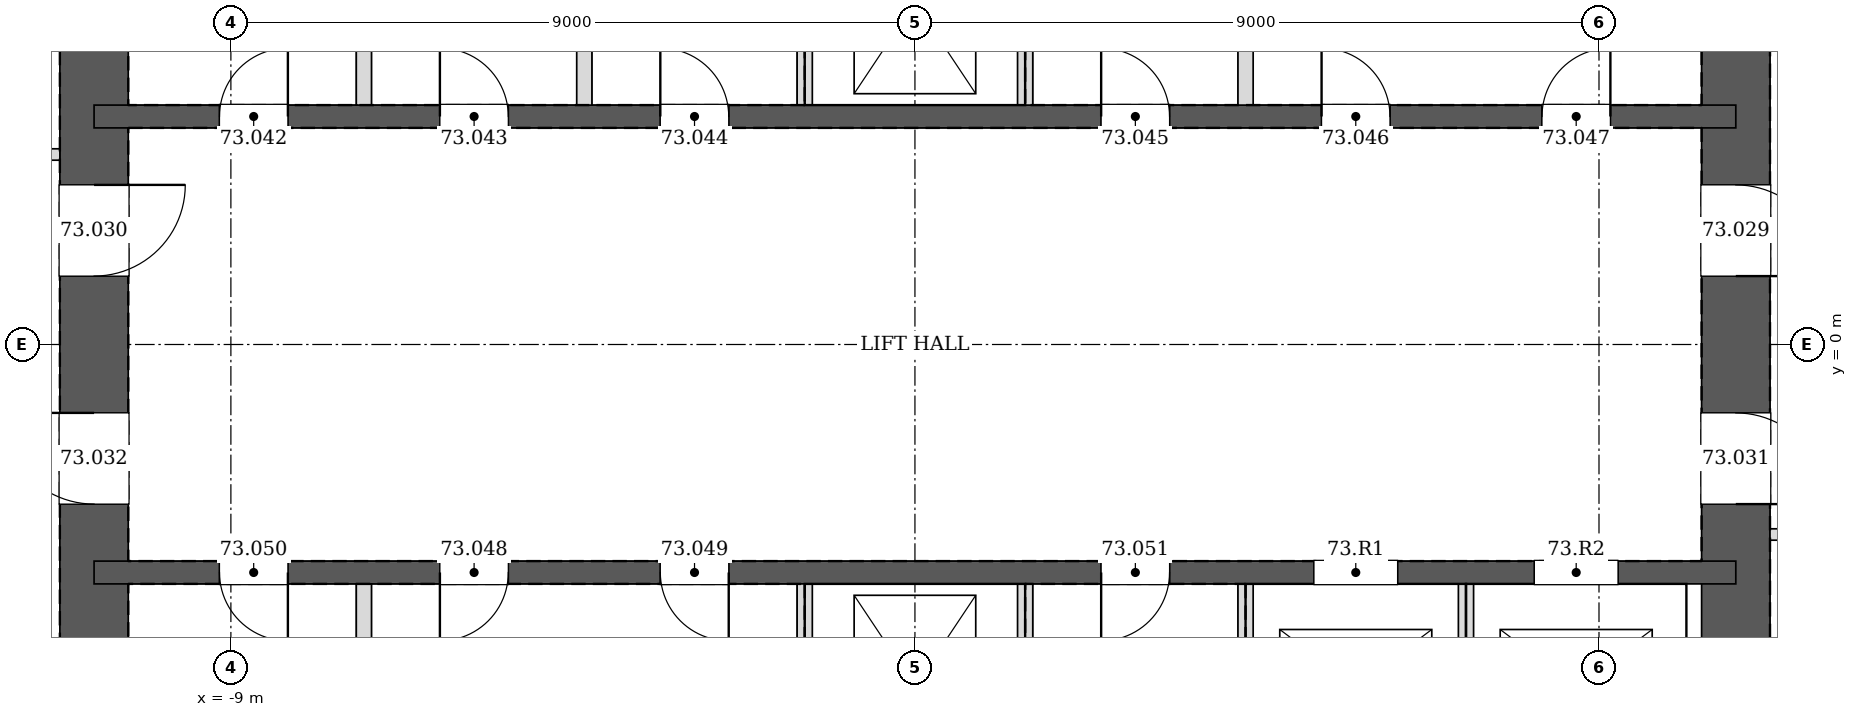
"""IFC4 building model, lengths in metres.
Left out: names, types, materials, properties, quantities, classifications, styles, units other than length and angle.
Written with IfcOpenShell. Run it as: python <this file> out.ifc"""

import sys

from ifc_helpers import new_model, si_unit, direction, frame, frame_2d, origin, place, context, subcontext, project, spatial, rectangle, extrude, element, fill, save


model = new_model("IFC4")
c1 = context("Model", 3, precision=1e-05, world=origin(), true_north=direction((0.0, 1.0)))
c2 = subcontext(c1, "Body", "Model", "MODEL_VIEW")
j1 = project(units=[si_unit("LENGTHUNIT", "METRE"), si_unit("PLANEANGLEUNIT", "RADIAN")], contexts=[c1])
p1 = place(None, origin())
s1 = spatial("IfcSite", under=j1, at=p1, CompositionType="ELEMENT")
p2 = place(p1, origin())
s2 = spatial("IfcBuilding", under=s1, at=p2, CompositionType="ELEMENT")
p3 = place(p2, frame((0.0, 0.0, 298.0)))
s3 = spatial("IfcBuildingStorey", under=s2, at=p3, CompositionType="ELEMENT", Elevation=298.0)
p4 = place(p3, frame((10.8, -10.8, 0.0), z_axis=(0.0, 0.0, 1.0), x_axis=(0.0, 1.0, 0.0)))
e1 = element("IfcWall", 1, at=p4, inside=s3, PredefinedType="SOLIDWALL", context=c2, shape_type="SweptSolid", body=[
    extrude(rectangle(XDim=21.6, YDim=0.9, at=frame_2d((10.8, 0.0))), origin(), (0.0, 0.0, 1.0), 3.4),
])
p5 = place(p4, frame((11.7, 0.0, 0.0)))
e2 = element("IfcOpeningElement", 2, at=p5, cuts=e1, PredefinedType="OPENING", context=c2, shape_type="SweptSolid", body=[
    extrude(rectangle(XDim=1.2, YDim=2.1, at=frame_2d((0.6, 1.05))), frame((0.0, 0.46, 0.0), z_axis=(0.0, -1.0, 0.0), x_axis=(1.0, 0.0, 0.0)), (0.0, 0.0, 1.0), 0.92),
])
p6 = place(p4, frame((8.7, 0.0, 0.0)))
e3 = element("IfcOpeningElement", 3, at=p6, cuts=e1, PredefinedType="OPENING", context=c2, shape_type="SweptSolid", body=[
    extrude(rectangle(XDim=1.2, YDim=2.1, at=frame_2d((0.6, 1.05))), frame((0.0, 0.46, 0.0), z_axis=(0.0, -1.0, 0.0), x_axis=(1.0, 0.0, 0.0)), (0.0, 0.0, 1.0), 0.92),
])
p7 = place(p3, frame((-10.8, 10.8, 0.0), z_axis=(0.0, 0.0, 1.0), x_axis=(0.0, -1.0, 0.0)))
e4 = element("IfcWall", 4, at=p7, inside=s3, PredefinedType="SOLIDWALL", context=c2, shape_type="SweptSolid", body=[
    extrude(rectangle(XDim=21.6, YDim=0.9, at=frame_2d((10.8, 0.0))), origin(), (0.0, 0.0, 1.0), 3.4),
])
p8 = place(p7, frame((8.7, 0.0, 0.0)))
e5 = element("IfcOpeningElement", 5, at=p8, cuts=e4, PredefinedType="OPENING", context=c2, shape_type="SweptSolid", body=[
    extrude(rectangle(XDim=1.2, YDim=2.1, at=frame_2d((0.6, 1.05))), frame((0.0, 0.46, 0.0), z_axis=(0.0, -1.0, 0.0), x_axis=(1.0, 0.0, 0.0)), (0.0, 0.0, 1.0), 0.92),
])
p9 = place(p7, frame((11.7, 0.0, 0.0)))
e6 = element("IfcOpeningElement", 6, at=p9, cuts=e4, PredefinedType="OPENING", context=c2, shape_type="SweptSolid", body=[
    extrude(rectangle(XDim=1.2, YDim=2.1, at=frame_2d((0.6, 1.05))), frame((0.0, 0.46, 0.0), z_axis=(0.0, -1.0, 0.0), x_axis=(1.0, 0.0, 0.0)), (0.0, 0.0, 1.0), 0.92),
])
p10 = place(p3, frame((-10.8, 3.0, 0.0), z_axis=(0.0, 0.0, 1.0), x_axis=(1.0, 0.0, 0.0)))
e7 = element("IfcWall", 7, at=p10, inside=s3, PredefinedType="SOLIDWALL", context=c2, shape_type="SweptSolid", body=[
    extrude(rectangle(XDim=21.6, YDim=0.3, at=frame_2d((10.8, 0.0))), origin(), (0.0, 0.0, 1.0), 3.4),
])
p11 = place(p10, frame((1.65, 0.0, 0.0)))
e8 = element("IfcOpeningElement", 8, at=p11, cuts=e7, PredefinedType="OPENING", context=c2, shape_type="SweptSolid", body=[
    extrude(rectangle(XDim=0.9, YDim=2.1, at=frame_2d((0.45, 1.05))), frame((0.0, 0.16, 0.0), z_axis=(0.0, -1.0, 0.0), x_axis=(1.0, 0.0, 0.0)), (0.0, 0.0, 1.0), 0.32),
])
p12 = place(p10, frame((4.55, 0.0, 0.0)))
e9 = element("IfcOpeningElement", 9, at=p12, cuts=e7, PredefinedType="OPENING", context=c2, shape_type="SweptSolid", body=[
    extrude(rectangle(XDim=0.9, YDim=2.1, at=frame_2d((0.45, 1.05))), frame((0.0, 0.16, 0.0), z_axis=(0.0, -1.0, 0.0), x_axis=(1.0, 0.0, 0.0)), (0.0, 0.0, 1.0), 0.32),
])
p13 = place(p10, frame((7.45, 0.0, 0.0)))
e10 = element("IfcOpeningElement", 10, at=p13, cuts=e7, PredefinedType="OPENING", context=c2, shape_type="SweptSolid", body=[
    extrude(rectangle(XDim=0.9, YDim=2.1, at=frame_2d((0.45, 1.05))), frame((0.0, 0.16, 0.0), z_axis=(0.0, -1.0, 0.0), x_axis=(1.0, 0.0, 0.0)), (0.0, 0.0, 1.0), 0.32),
])
p14 = place(p10, frame((13.25, 0.0, 0.0)))
e11 = element("IfcOpeningElement", 11, at=p14, cuts=e7, PredefinedType="OPENING", context=c2, shape_type="SweptSolid", body=[
    extrude(rectangle(XDim=0.9, YDim=2.1, at=frame_2d((0.45, 1.05))), frame((0.0, 0.16, 0.0), z_axis=(0.0, -1.0, 0.0), x_axis=(1.0, 0.0, 0.0)), (0.0, 0.0, 1.0), 0.32),
])
p15 = place(p10, frame((16.15, 0.0, 0.0)))
e12 = element("IfcOpeningElement", 12, at=p15, cuts=e7, PredefinedType="OPENING", context=c2, shape_type="SweptSolid", body=[
    extrude(rectangle(XDim=0.9, YDim=2.1, at=frame_2d((0.45, 1.05))), frame((0.0, 0.16, 0.0), z_axis=(0.0, -1.0, 0.0), x_axis=(1.0, 0.0, 0.0)), (0.0, 0.0, 1.0), 0.32),
])
p16 = place(p10, frame((19.05, 0.0, 0.0)))
e13 = element("IfcOpeningElement", 13, at=p16, cuts=e7, PredefinedType="OPENING", context=c2, shape_type="SweptSolid", body=[
    extrude(rectangle(XDim=0.9, YDim=2.1, at=frame_2d((0.45, 1.05))), frame((0.0, 0.16, 0.0), z_axis=(0.0, -1.0, 0.0), x_axis=(1.0, 0.0, 0.0)), (0.0, 0.0, 1.0), 0.32),
])
p17 = place(p3, frame((-10.8, -3.0, 0.0), z_axis=(0.0, 0.0, 1.0), x_axis=(1.0, 0.0, 0.0)))
e14 = element("IfcWall", 14, at=p17, inside=s3, PredefinedType="SOLIDWALL", context=c2, shape_type="SweptSolid", body=[
    extrude(rectangle(XDim=21.6, YDim=0.3, at=frame_2d((10.8, 0.0))), origin(), (0.0, 0.0, 1.0), 3.4),
])
p18 = place(p17, frame((4.55, 0.0, 0.0)))
e15 = element("IfcOpeningElement", 15, at=p18, cuts=e14, PredefinedType="OPENING", context=c2, shape_type="SweptSolid", body=[
    extrude(rectangle(XDim=0.9, YDim=2.1, at=frame_2d((0.45, 1.05))), frame((0.0, 0.16, 0.0), z_axis=(0.0, -1.0, 0.0), x_axis=(1.0, 0.0, 0.0)), (0.0, 0.0, 1.0), 0.32),
])
p19 = place(p17, frame((7.45, 0.0, 0.0)))
e16 = element("IfcOpeningElement", 16, at=p19, cuts=e14, PredefinedType="OPENING", context=c2, shape_type="SweptSolid", body=[
    extrude(rectangle(XDim=0.9, YDim=2.1, at=frame_2d((0.45, 1.05))), frame((0.0, 0.16, 0.0), z_axis=(0.0, -1.0, 0.0), x_axis=(1.0, 0.0, 0.0)), (0.0, 0.0, 1.0), 0.32),
])
p20 = place(p17, frame((1.65, 0.0, 0.0)))
e17 = element("IfcOpeningElement", 17, at=p20, cuts=e14, PredefinedType="OPENING", context=c2, shape_type="SweptSolid", body=[
    extrude(rectangle(XDim=0.9, YDim=2.1, at=frame_2d((0.45, 1.05))), frame((0.0, 0.16, 0.0), z_axis=(0.0, -1.0, 0.0), x_axis=(1.0, 0.0, 0.0)), (0.0, 0.0, 1.0), 0.32),
])
p21 = place(p17, frame((13.25, 0.0, 0.0)))
e18 = element("IfcOpeningElement", 18, at=p21, cuts=e14, PredefinedType="OPENING", context=c2, shape_type="SweptSolid", body=[
    extrude(rectangle(XDim=0.9, YDim=2.1, at=frame_2d((0.45, 1.05))), frame((0.0, 0.16, 0.0), z_axis=(0.0, -1.0, 0.0), x_axis=(1.0, 0.0, 0.0)), (0.0, 0.0, 1.0), 0.32),
])
p22 = place(p17, frame((16.05, 0.0, 0.0)))
e19 = element("IfcOpeningElement", 19, at=p22, cuts=e14, PredefinedType="OPENING", context=c2, shape_type="SweptSolid", body=[
    extrude(rectangle(XDim=1.1, YDim=2.1, at=frame_2d((0.55, 1.05))), frame((0.0, 0.16, 0.0), z_axis=(0.0, -1.0, 0.0), x_axis=(1.0, 0.0, 0.0)), (0.0, 0.0, 1.0), 0.32),
])
p23 = place(p17, frame((18.95, 0.0, 0.0)))
e20 = element("IfcOpeningElement", 20, at=p23, cuts=e14, PredefinedType="OPENING", context=c2, shape_type="SweptSolid", body=[
    extrude(rectangle(XDim=1.1, YDim=2.1, at=frame_2d((0.55, 1.05))), frame((0.0, 0.16, 0.0), z_axis=(0.0, -1.0, 0.0), x_axis=(1.0, 0.0, 0.0)), (0.0, 0.0, 1.0), 0.32),
])
p24 = place(p3, frame((11.25, -2.5, 0.0), z_axis=(0.0, 0.0, 1.0), x_axis=(1.0, 0.0, 0.0)))
e21 = element("IfcWall", 21, at=p24, inside=s3, PredefinedType="PARTITIONING", context=c2, shape_type="SweptSolid", body=[
    extrude(rectangle(XDim=1.65, YDim=0.15, at=frame_2d((0.825, 0.0))), origin(), (0.0, 0.0, 1.0), 3.2),
])
p25 = place(p3, frame((-11.25, 2.5, 0.0), z_axis=(0.0, 0.0, 1.0), x_axis=(-1.0, 0.0, 0.0)))
e22 = element("IfcWall", 22, at=p25, inside=s3, PredefinedType="PARTITIONING", context=c2, shape_type="SweptSolid", body=[
    extrude(rectangle(XDim=1.65, YDim=0.15, at=frame_2d((0.825, 0.0))), origin(), (0.0, 0.0, 1.0), 3.2),
])
p26 = place(p25, frame((0.35, 0.0, 0.0)))
e23 = element("IfcOpeningElement", 23, at=p26, cuts=e22, PredefinedType="OPENING", context=c2, shape_type="SweptSolid", body=[
    extrude(rectangle(XDim=0.95, YDim=2.1, at=frame_2d((0.475, 1.05))), frame((0.0, 0.085, 0.0), z_axis=(0.0, -1.0, 0.0), x_axis=(1.0, 0.0, 0.0)), (0.0, 0.0, 1.0), 0.17),
])
for number, where, z_axis, x_axis in (
    (24, (-7.25, 3.15, 0.0), (0.0, 0.0, 1.0), (0.0, 1.0, 0.0)),
    (25, (-4.35, 3.15, 0.0), (0.0, 0.0, 1.0), (0.0, 1.0, 0.0)),
    (26, (-1.45, 3.15, 0.0), (0.0, 0.0, 1.0), (0.0, 1.0, 0.0)),
    (27, (1.45, 3.15, 0.0), (0.0, 0.0, 1.0), (0.0, 1.0, 0.0)),
    (28, (4.35, 3.15, 0.0), (0.0, 0.0, 1.0), (0.0, 1.0, 0.0)),
    (29, (-7.25, -5.85, 0.0), (0.0, 0.0, 1.0), (0.0, 1.0, 0.0)),
    (30, (-1.45, -5.85, 0.0), (0.0, 0.0, 1.0), (0.0, 1.0, 0.0)),
    (31, (1.45, -5.85, 0.0), (0.0, 0.0, 1.0), (0.0, 1.0, 0.0)),
    (32, (4.35, -5.85, 0.0), (0.0, 0.0, 1.0), (0.0, 1.0, 0.0)),
):
    element("IfcWall", number, at=place(p3, frame(where, z_axis=z_axis, x_axis=x_axis)), inside=s3, PredefinedType="PARTITIONING", context=c2, shape_type="SweptSolid", body=[
        extrude(rectangle(XDim=2.7, YDim=0.2, at=frame_2d((1.35, 0.0))), origin(), (0.0, 0.0, 1.0), 3.2),
    ])
p27 = place(p3, frame((7.25, -5.85, 0.0), z_axis=(0.0, 0.0, 1.0), x_axis=(0.0, 1.0, 0.0)))
e33 = element("IfcWall", 33, at=p27, inside=s3, PredefinedType="PARTITIONING", context=c2, shape_type="SweptSolid", body=[
    extrude(rectangle(XDim=2.7, YDim=0.2, at=frame_2d((1.35, 0.0))), origin(), (0.0, 0.0, 1.0), 3.4),
])
p28 = place(p5, frame((1.2, 0.0, 0.0), z_axis=(0.0, 0.0, 1.0), x_axis=(-1.0, 0.0, 0.0)))
e34 = element("IfcDoor", 34, at=p28, inside=s3, OperationType="SINGLE_SWING_RIGHT", PredefinedType="DOOR", context=c2, shape_type="SweptSolid", body=[
    extrude(rectangle(XDim=1.2, YDim=2.1, at=frame_2d((0.6, 1.05))), frame((0.0, 0.025, 0.0), z_axis=(0.0, -1.0, 0.0), x_axis=(1.0, 0.0, 0.0)), (0.0, 0.0, 1.0), 0.05),
])
fill(e2, e34)
p29 = place(p8, origin())
e35 = element("IfcDoor", 35, at=p29, inside=s3, OperationType="SINGLE_SWING_LEFT", PredefinedType="DOOR", context=c2, shape_type="SweptSolid", body=[
    extrude(rectangle(XDim=1.2, YDim=2.1, at=frame_2d((0.6, 1.05))), frame((0.0, 0.025, 0.0), z_axis=(0.0, -1.0, 0.0), x_axis=(1.0, 0.0, 0.0)), (0.0, 0.0, 1.0), 0.05),
])
fill(e5, e35)
p30 = place(p6, frame((1.2, 0.0, 0.0), z_axis=(0.0, 0.0, 1.0), x_axis=(-1.0, 0.0, 0.0)))
e36 = element("IfcDoor", 36, at=p30, inside=s3, OperationType="SINGLE_SWING_RIGHT", PredefinedType="DOOR", context=c2, shape_type="SweptSolid", body=[
    extrude(rectangle(XDim=1.2, YDim=2.1, at=frame_2d((0.6, 1.05))), frame((0.0, 0.025, 0.0), z_axis=(0.0, -1.0, 0.0), x_axis=(1.0, 0.0, 0.0)), (0.0, 0.0, 1.0), 0.05),
])
fill(e3, e36)
p31 = place(p9, frame((1.2, 0.0, 0.0), z_axis=(0.0, 0.0, 1.0), x_axis=(-1.0, 0.0, 0.0)))
e37 = element("IfcDoor", 37, at=p31, inside=s3, OperationType="SINGLE_SWING_RIGHT", PredefinedType="DOOR", context=c2, shape_type="SweptSolid", body=[
    extrude(rectangle(XDim=1.2, YDim=2.1, at=frame_2d((0.6, 1.05))), frame((0.0, 0.025, 0.0), z_axis=(0.0, -1.0, 0.0), x_axis=(1.0, 0.0, 0.0)), (0.0, 0.0, 1.0), 0.05),
])
fill(e6, e37)
p32 = place(p11, origin())
e38 = element("IfcDoor", 38, at=p32, inside=s3, OperationType="SINGLE_SWING_RIGHT", PredefinedType="DOOR", context=c2, shape_type="SweptSolid", body=[
    extrude(rectangle(XDim=0.9, YDim=2.1, at=frame_2d((0.45, 1.05))), frame((0.0, 0.025, 0.0), z_axis=(0.0, -1.0, 0.0), x_axis=(1.0, 0.0, 0.0)), (0.0, 0.0, 1.0), 0.05),
])
fill(e8, e38)
p33 = place(p12, origin())
e39 = element("IfcDoor", 39, at=p33, inside=s3, OperationType="SINGLE_SWING_LEFT", PredefinedType="DOOR", context=c2, shape_type="SweptSolid", body=[
    extrude(rectangle(XDim=0.9, YDim=2.1, at=frame_2d((0.45, 1.05))), frame((0.0, 0.025, 0.0), z_axis=(0.0, -1.0, 0.0), x_axis=(1.0, 0.0, 0.0)), (0.0, 0.0, 1.0), 0.05),
])
fill(e9, e39)
p34 = place(p13, origin())
e40 = element("IfcDoor", 40, at=p34, inside=s3, OperationType="SINGLE_SWING_LEFT", PredefinedType="DOOR", context=c2, shape_type="SweptSolid", body=[
    extrude(rectangle(XDim=0.9, YDim=2.1, at=frame_2d((0.45, 1.05))), frame((0.0, 0.025, 0.0), z_axis=(0.0, -1.0, 0.0), x_axis=(1.0, 0.0, 0.0)), (0.0, 0.0, 1.0), 0.05),
])
fill(e10, e40)
p35 = place(p14, origin())
e41 = element("IfcDoor", 41, at=p35, inside=s3, OperationType="SINGLE_SWING_LEFT", PredefinedType="DOOR", context=c2, shape_type="SweptSolid", body=[
    extrude(rectangle(XDim=0.9, YDim=2.1, at=frame_2d((0.45, 1.05))), frame((0.0, 0.025, 0.0), z_axis=(0.0, -1.0, 0.0), x_axis=(1.0, 0.0, 0.0)), (0.0, 0.0, 1.0), 0.05),
])
fill(e11, e41)
p36 = place(p15, origin())
e42 = element("IfcDoor", 42, at=p36, inside=s3, OperationType="SINGLE_SWING_LEFT", PredefinedType="DOOR", context=c2, shape_type="SweptSolid", body=[
    extrude(rectangle(XDim=0.9, YDim=2.1, at=frame_2d((0.45, 1.05))), frame((0.0, 0.025, 0.0), z_axis=(0.0, -1.0, 0.0), x_axis=(1.0, 0.0, 0.0)), (0.0, 0.0, 1.0), 0.05),
])
fill(e12, e42)
p37 = place(p16, origin())
e43 = element("IfcDoor", 43, at=p37, inside=s3, OperationType="SINGLE_SWING_RIGHT", PredefinedType="DOOR", context=c2, shape_type="SweptSolid", body=[
    extrude(rectangle(XDim=0.9, YDim=2.1, at=frame_2d((0.45, 1.05))), frame((0.0, 0.025, 0.0), z_axis=(0.0, -1.0, 0.0), x_axis=(1.0, 0.0, 0.0)), (0.0, 0.0, 1.0), 0.05),
])
fill(e13, e43)
p38 = place(p18, frame((0.9, 0.0, 0.0), z_axis=(0.0, 0.0, 1.0), x_axis=(-1.0, 0.0, 0.0)))
e44 = element("IfcDoor", 44, at=p38, inside=s3, OperationType="SINGLE_SWING_RIGHT", PredefinedType="DOOR", context=c2, shape_type="SweptSolid", body=[
    extrude(rectangle(XDim=0.9, YDim=2.1, at=frame_2d((0.45, 1.05))), frame((0.0, 0.025, 0.0), z_axis=(0.0, -1.0, 0.0), x_axis=(1.0, 0.0, 0.0)), (0.0, 0.0, 1.0), 0.05),
])
fill(e15, e44)
p39 = place(p19, frame((0.9, 0.0, 0.0), z_axis=(0.0, 0.0, 1.0), x_axis=(-1.0, 0.0, 0.0)))
e45 = element("IfcDoor", 45, at=p39, inside=s3, OperationType="SINGLE_SWING_LEFT", PredefinedType="DOOR", context=c2, shape_type="SweptSolid", body=[
    extrude(rectangle(XDim=0.9, YDim=2.1, at=frame_2d((0.45, 1.05))), frame((0.0, 0.025, 0.0), z_axis=(0.0, -1.0, 0.0), x_axis=(1.0, 0.0, 0.0)), (0.0, 0.0, 1.0), 0.05),
])
fill(e16, e45)
p40 = place(p20, frame((0.9, 0.0, 0.0), z_axis=(0.0, 0.0, 1.0), x_axis=(-1.0, 0.0, 0.0)))
e46 = element("IfcDoor", 46, at=p40, inside=s3, OperationType="SINGLE_SWING_LEFT", PredefinedType="DOOR", context=c2, shape_type="SweptSolid", body=[
    extrude(rectangle(XDim=0.9, YDim=2.1, at=frame_2d((0.45, 1.05))), frame((0.0, 0.025, 0.0), z_axis=(0.0, -1.0, 0.0), x_axis=(1.0, 0.0, 0.0)), (0.0, 0.0, 1.0), 0.05),
])
fill(e17, e46)
p41 = place(p21, frame((0.9, 0.0, 0.0), z_axis=(0.0, 0.0, 1.0), x_axis=(-1.0, 0.0, 0.0)))
e47 = element("IfcDoor", 47, at=p41, inside=s3, OperationType="SINGLE_SWING_RIGHT", PredefinedType="DOOR", context=c2, shape_type="SweptSolid", body=[
    extrude(rectangle(XDim=0.9, YDim=2.1, at=frame_2d((0.45, 1.05))), frame((0.0, 0.025, 0.0), z_axis=(0.0, -1.0, 0.0), x_axis=(1.0, 0.0, 0.0)), (0.0, 0.0, 1.0), 0.05),
])
fill(e18, e47)
p42 = place(p22, origin())
e48 = element("IfcDoor", 48, at=p42, inside=s3, OperationType="DOUBLE_DOOR_SLIDING", PredefinedType="DOOR", context=c2, shape_type="SweptSolid", body=[
    extrude(rectangle(XDim=1.1, YDim=2.1, at=frame_2d((0.55, 1.05))), frame((0.0, 0.025, 0.0), z_axis=(0.0, -1.0, 0.0), x_axis=(1.0, 0.0, 0.0)), (0.0, 0.0, 1.0), 0.05),
])
fill(e19, e48)
p43 = place(p23, origin())
e49 = element("IfcDoor", 49, at=p43, inside=s3, OperationType="DOUBLE_DOOR_SLIDING", PredefinedType="DOOR", context=c2, shape_type="SweptSolid", body=[
    extrude(rectangle(XDim=1.1, YDim=2.1, at=frame_2d((0.55, 1.05))), frame((0.0, 0.025, 0.0), z_axis=(0.0, -1.0, 0.0), x_axis=(1.0, 0.0, 0.0)), (0.0, 0.0, 1.0), 0.05),
])
fill(e20, e49)
save(model, sys.argv[1])
